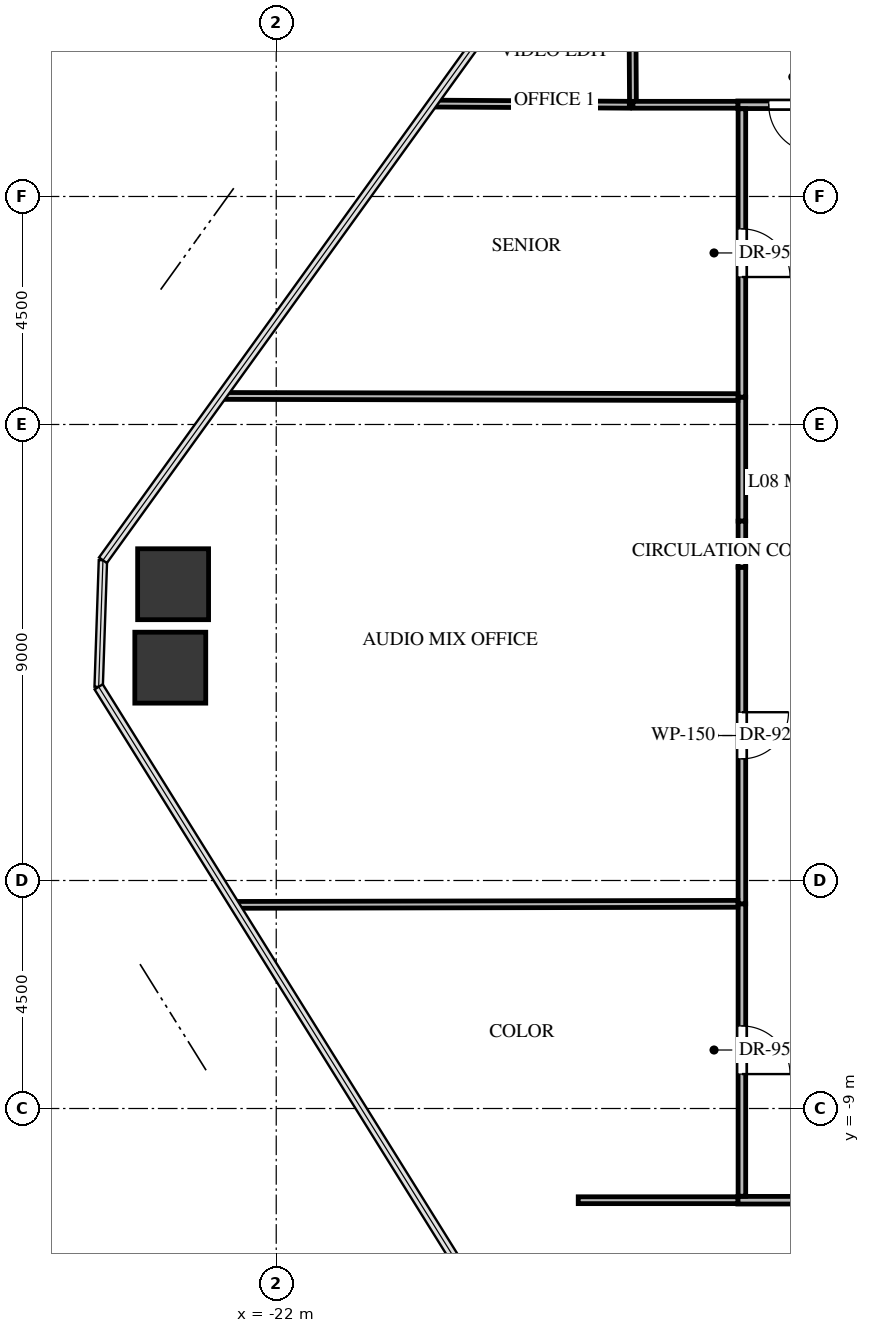
"""IFC4 building model, lengths in metres.
Left out: names, types, materials, properties, quantities, classifications, styles, units other than length and angle.
Written with IfcOpenShell. Run it as: python <this file> out.ifc"""

import sys

from ifc_helpers import new_model, si_unit, direction, frame, frame_2d, origin, origin_2d, place, context, subcontext, project, spatial, rectangle, extrude, source, transform, mapped, element, fill, save


model = new_model("IFC4")
c1 = context("Model", 3, precision=1e-05, world=origin(), true_north=direction((0.0, 1.0)))
c2 = subcontext(c1, "Body", "Model", "MODEL_VIEW")
j1 = project(units=[si_unit("LENGTHUNIT", "METRE"), si_unit("PLANEANGLEUNIT", "RADIAN")], contexts=[c1])
p1 = place(None, origin())
s1 = spatial("IfcSite", under=j1, at=p1, CompositionType="ELEMENT")
p2 = place(p1, origin())
s2 = spatial("IfcBuilding", under=s1, at=p2, CompositionType="ELEMENT")
p3 = place(p2, frame((0.0, 0.0, 39.0)))
s3 = spatial("IfcBuildingStorey", under=s2, at=p3, CompositionType="ELEMENT", Elevation=39.0)
m1 = source(origin(), c2, "Body", "SweptSolid", [
    extrude(rectangle(XDim=1.4, YDim=1.4, at=origin_2d()), origin(), (0.0, 0.0, 1.0), 3.3),
])
for number, where, z_axis, x_axis in (
    (1, (-24.091, -0.3, -0.24), (0.0, 0.0, 1.0), (1.0, 0.0, 0.0)),
    (2, (-24.035, 1.347, -0.24), (0.0, 0.0, 1.0), (1.0, 0.0, 0.0)),
):
    element("IfcColumn", number, at=place(p3, frame(where, z_axis=z_axis, x_axis=x_axis)), inside=s3, PredefinedType="COLUMN", context=c2, shape_type="MappedRepresentation", body=[
        mapped(m1, transform((0.0, 0.0, 0.0), x_axis=(1.0, 0.0, 0.0), y_axis=(0.0, 1.0, 0.0), z_axis=(0.0, 0.0, 1.0), scale=1.0)),
    ])
p4 = place(p3, frame((-10.72, 10.81, 0.0), z_axis=(0.0, 0.0, 1.0), x_axis=(-1.0, 0.0, 0.0)))
e3 = element("IfcWall", 3, at=p4, inside=s3, PredefinedType="PARTITIONING", context=c2, shape_type="SweptSolid", body=[
    extrude(rectangle(XDim=2.17, YDim=0.15, at=frame_2d((1.085, 0.0))), origin(), (0.0, 0.0, 1.0), 3.045),
])
p5 = place(p4, frame((0.61, 0.0, 0.0)))
e4 = element("IfcOpeningElement", 4, at=p5, cuts=e3, PredefinedType="OPENING", context=c2, shape_type="SweptSolid", body=[
    extrude(rectangle(XDim=0.95, YDim=2.1, at=frame_2d((0.475, 1.05))), frame((0.0, 0.085, 0.0), z_axis=(0.0, -1.0, 0.0), x_axis=(1.0, 0.0, 0.0)), (0.0, 0.0, 1.0), 0.17),
])
p6 = place(p3, frame((-12.89, -10.81, 0.0), z_axis=(0.0, 0.0, 1.0), x_axis=(1.0, 0.0, 0.0)))
e5 = element("IfcWall", 5, at=p6, inside=s3, PredefinedType="PARTITIONING", context=c2, shape_type="SweptSolid", body=[
    extrude(rectangle(XDim=3.43, YDim=0.15, at=frame_2d((1.715, 0.0))), origin(), (0.0, 0.0, 1.0), 3.045),
])
p7 = place(p6, frame((1.255, 0.0, 0.0)))
e6 = element("IfcOpeningElement", 6, at=p7, cuts=e5, PredefinedType="OPENING", context=c2, shape_type="SweptSolid", body=[
    extrude(rectangle(XDim=0.92, YDim=2.1, at=frame_2d((0.46, 1.05))), frame((0.0, 0.085, 0.0), z_axis=(0.0, -1.0, 0.0), x_axis=(1.0, 0.0, 0.0)), (0.0, 0.0, 1.0), 0.17),
])
p8 = place(p3, frame((-12.81, -4.96, 0.0), z_axis=(0.0, 0.0, 1.0), x_axis=(0.0, -1.0, 0.0)))
e7 = element("IfcWall", 7, at=p8, inside=s3, PredefinedType="PARTITIONING", context=c2, shape_type="SweptSolid", body=[
    extrude(rectangle(XDim=5.771, YDim=0.15, at=frame_2d((2.885, 0.0))), origin(), (0.0, 0.0, 1.0), 3.045),
])
p9 = place(p8, frame((2.41, 0.0, 0.0)))
e8 = element("IfcOpeningElement", 8, at=p9, cuts=e7, PredefinedType="OPENING", context=c2, shape_type="SweptSolid", body=[
    extrude(rectangle(XDim=0.95, YDim=2.1, at=frame_2d((0.475, 1.05))), frame((0.0, 0.085, 0.0), z_axis=(0.0, -1.0, 0.0), x_axis=(1.0, 0.0, 0.0)), (0.0, 0.0, 1.0), 0.17),
])
p10 = place(p3, frame((-12.81, 5.04, 0.0), z_axis=(0.0, 0.0, 1.0), x_axis=(0.0, -1.0, 0.0)))
e9 = element("IfcWall", 9, at=p10, inside=s3, PredefinedType="PARTITIONING", context=c2, shape_type="SweptSolid", body=[
    extrude(rectangle(XDim=2.448, YDim=0.15, at=frame_2d((1.224, 0.0))), origin(), (0.0, 0.0, 1.0), 3.045),
])
p11 = place(p3, frame((-12.81, 1.682, 0.0), z_axis=(0.0, 0.0, 1.0), x_axis=(0.0, -1.0, 0.0)))
e10 = element("IfcWall", 10, at=p11, inside=s3, PredefinedType="PARTITIONING", context=c2, shape_type="SweptSolid", body=[
    extrude(rectangle(XDim=6.642, YDim=0.15, at=frame_2d((3.321, 0.0))), origin(), (0.0, 0.0, 1.0), 3.045),
])
p12 = place(p11, frame((2.861, 0.0, 0.0)))
e11 = element("IfcOpeningElement", 11, at=p12, cuts=e10, PredefinedType="OPENING", context=c2, shape_type="SweptSolid", body=[
    extrude(rectangle(XDim=0.92, YDim=2.1, at=frame_2d((0.46, 1.05))), frame((0.0, 0.085, 0.0), z_axis=(0.0, -1.0, 0.0), x_axis=(1.0, 0.0, 0.0)), (0.0, 0.0, 1.0), 0.17),
])
p13 = place(p3, frame((-12.81, 2.592, 0.0), z_axis=(0.0, 0.0, 1.0), x_axis=(0.0, -1.0, 0.0)))
e12 = element("IfcWall", 12, at=p13, inside=s3, PredefinedType="PARTITIONING", context=c2, shape_type="SweptSolid", body=[
    extrude(rectangle(XDim=0.91, YDim=0.15, at=frame_2d((0.455, 0.0))), origin(), (0.0, 0.0, 1.0), 2.13),
])
p14 = place(p3, frame((-12.81, 10.731, 0.0), z_axis=(0.0, 0.0, 1.0), x_axis=(0.0, -1.0, 0.0)))
e13 = element("IfcWall", 13, at=p14, inside=s3, PredefinedType="PARTITIONING", context=c2, shape_type="SweptSolid", body=[
    extrude(rectangle(XDim=5.691, YDim=0.15, at=frame_2d((2.845, 0.0))), origin(), (0.0, 0.0, 1.0), 3.045),
])
p15 = place(p14, frame((2.371, 0.0, 0.0)))
e14 = element("IfcOpeningElement", 14, at=p15, cuts=e13, PredefinedType="OPENING", context=c2, shape_type="SweptSolid", body=[
    extrude(rectangle(XDim=0.95, YDim=2.1, at=frame_2d((0.475, 1.05))), frame((0.0, 0.085, 0.0), z_axis=(0.0, -1.0, 0.0), x_axis=(1.0, 0.0, 0.0)), (0.0, 0.0, 1.0), 0.17),
])
p16 = place(p3, frame((-14.992, 16.283, 0.0), z_axis=(0.0, 0.0, 1.0), x_axis=(0.005932363604, -0.999982403376, 0.0)))
e15 = element("IfcWall", 15, at=p16, inside=s3, PredefinedType="PARTITIONING", context=c2, shape_type="SweptSolid", body=[
    extrude(rectangle(XDim=5.473, YDim=0.135, at=frame_2d((2.737, 0.0))), origin(), (0.0, 0.0, 1.0), 2.38),
])
p17 = place(p16, frame((2.287, 0.0, 0.0)))
e16 = element("IfcOpeningElement", 16, at=p17, cuts=e15, PredefinedType="OPENING", context=c2, shape_type="SweptSolid", body=[
    extrude(rectangle(XDim=0.9, YDim=2.05, at=frame_2d((0.45, 1.025))), frame((0.0, 0.078, 0.0), z_axis=(0.0, -1.0, 0.0), x_axis=(1.0, 0.0, 0.0)), (0.0, 0.0, 1.0), 0.155),
])
p18 = place(p3, frame((-15.031, 10.81, 0.0), z_axis=(0.0, 0.0, 1.0), x_axis=(-0.999982229424, 0.005961613542, 0.0)))
e17 = element("IfcWall", 17, at=p18, inside=s3, PredefinedType="PARTITIONING", context=c2, shape_type="SweptSolid", body=[
    extrude(rectangle(XDim=3.89, YDim=0.135, at=frame_2d((1.945, 0.0))), origin(), (0.0, 0.0, 1.0), 2.38),
])
p19 = place(p3, frame((-12.89, 10.81, 0.0), z_axis=(0.0, 0.0, 1.0), x_axis=(-1.0, 0.0, 0.0)))
e18 = element("IfcWall", 18, at=p19, inside=s3, PredefinedType="PARTITIONING", context=c2, shape_type="SweptSolid", body=[
    extrude(rectangle(XDim=2.07, YDim=0.135, at=frame_2d((1.035, 0.0))), origin(), (0.0, 0.0, 1.0), 3.045),
])
p20 = place(p3, frame((-16.04, -10.81, 0.0), z_axis=(0.0, 0.0, 1.0), x_axis=(1.0, 0.0, 0.0)))
e19 = element("IfcWall", 19, at=p20, inside=s3, PredefinedType="PARTITIONING", context=c2, shape_type="SweptSolid", body=[
    extrude(rectangle(XDim=3.15, YDim=0.135, at=frame_2d((1.575, 0.0))), origin(), (0.0, 0.0, 1.0), 3.045),
])
p21 = place(p3, frame((-22.825, -4.981, 0.0), z_axis=(0.0, 0.0, 1.0), x_axis=(0.999997767357, 0.002113121234, 0.0)))
e20 = element("IfcWall", 20, at=p21, inside=s3, PredefinedType="PARTITIONING", context=c2, shape_type="SweptSolid", body=[
    extrude(rectangle(XDim=9.936, YDim=0.135, at=frame_2d((4.968, 0.0))), origin(), (0.0, 0.0, 1.0), 2.38),
])
p22 = place(p3, frame((-23.082, 5.063, 0.0), z_axis=(0.0, 0.0, 1.0), x_axis=(0.999997411176, -0.002275443211, 0.0)))
e21 = element("IfcWall", 21, at=p22, inside=s3, PredefinedType="PARTITIONING", context=c2, shape_type="SweptSolid", body=[
    extrude(rectangle(XDim=10.193, YDim=0.135, at=frame_2d((5.096, 0.0))), origin(), (0.0, 0.0, 1.0), 2.38),
])
m2 = source(origin(), c2, "Body", "SweptSolid", [
    extrude(rectangle(XDim=0.95, YDim=2.1, at=frame_2d((0.475, 1.05))), frame((0.0, 0.025, 0.0), z_axis=(0.0, -1.0, 0.0), x_axis=(1.0, 0.0, 0.0)), (0.0, 0.0, 1.0), 0.05),
])
p23 = place(p5, origin())
e22 = element("IfcDoor", 22, at=p23, inside=s3, OperationType="SINGLE_SWING_LEFT", PredefinedType="DOOR", context=c2, shape_type="MappedRepresentation", body=[
    mapped(m2, transform((0.0, 0.0, 0.0), x_axis=(1.0, 0.0, 0.0), y_axis=(0.0, 1.0, 0.0), z_axis=(0.0, 0.0, 1.0), scale=1.0)),
])
fill(e4, e22)
m3 = source(origin(), c2, "Body", "SweptSolid", [
    extrude(rectangle(XDim=0.95, YDim=2.1, at=frame_2d((0.475, 1.05))), frame((0.0, 0.025, 0.0), z_axis=(0.0, -1.0, 0.0), x_axis=(1.0, 0.0, 0.0)), (0.0, 0.0, 1.0), 0.05),
])
p24 = place(p9, origin())
e23 = element("IfcDoor", 23, at=p24, inside=s3, OperationType="SINGLE_SWING_RIGHT", PredefinedType="DOOR", context=c2, shape_type="MappedRepresentation", body=[
    mapped(m3, transform((0.0, 0.0, 0.0), x_axis=(1.0, 0.0, 0.0), y_axis=(0.0, 1.0, 0.0), z_axis=(0.0, 0.0, 1.0), scale=1.0)),
])
fill(e8, e23)
m4 = source(origin(), c2, "Body", "SweptSolid", [
    extrude(rectangle(XDim=0.92, YDim=2.1, at=frame_2d((0.46, 1.05))), frame((0.0, 0.025, 0.0), z_axis=(0.0, -1.0, 0.0), x_axis=(1.0, 0.0, 0.0)), (0.0, 0.0, 1.0), 0.05),
])
p25 = place(p12, origin())
e24 = element("IfcDoor", 24, at=p25, inside=s3, OperationType="SINGLE_SWING_LEFT", PredefinedType="DOOR", context=c2, shape_type="MappedRepresentation", body=[
    mapped(m4, transform((0.0, 0.0, 0.0), x_axis=(1.0, 0.0, 0.0), y_axis=(0.0, 1.0, 0.0), z_axis=(0.0, 0.0, 1.0), scale=1.0)),
])
fill(e11, e24)
p26 = place(p15, origin())
e25 = element("IfcDoor", 25, at=p26, inside=s3, OperationType="SINGLE_SWING_RIGHT", PredefinedType="DOOR", context=c2, shape_type="MappedRepresentation", body=[
    mapped(m3, transform((0.0, 0.0, 0.0), x_axis=(1.0, 0.0, 0.0), y_axis=(0.0, 1.0, 0.0), z_axis=(0.0, 0.0, 1.0), scale=1.0)),
])
fill(e14, e25)
save(model, sys.argv[1])
